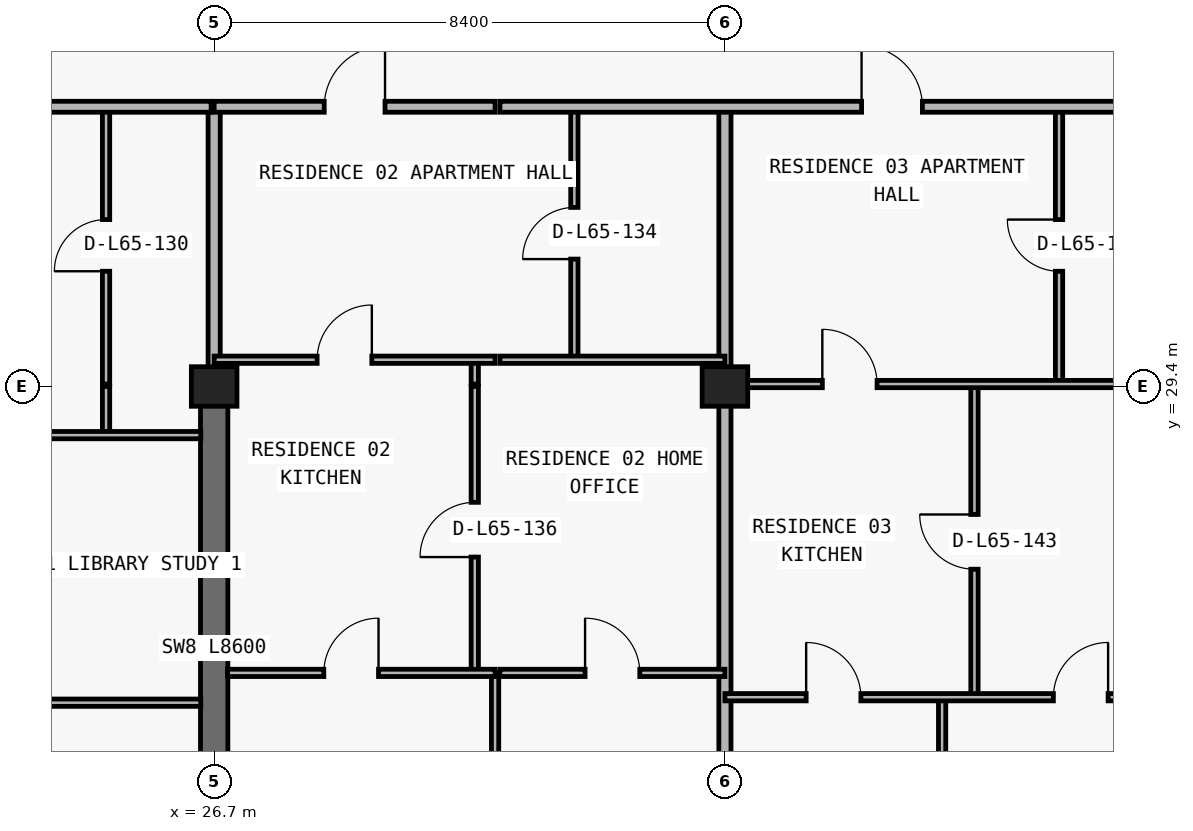
"""IFC4 building model, lengths in metres.
Left out: names, types, materials, properties, quantities, classifications, styles, units other than length and angle.
Written with IfcOpenShell. Run it as: python <this file> out.ifc"""

import sys

from ifc_helpers import new_model, si_unit, direction, frame, frame_2d, origin, origin_2d, place, context, subcontext, project, spatial, rectangle, extrude, element, fill, save


model = new_model("IFC4")
c1 = context("Model", 3, precision=1e-05, world=origin(), true_north=direction((0.0, 1.0)))
c2 = subcontext(c1, "Body", "Model", "MODEL_VIEW")
j1 = project(units=[si_unit("LENGTHUNIT", "METRE"), si_unit("PLANEANGLEUNIT", "RADIAN")], contexts=[c1])
p1 = place(None, origin())
s1 = spatial("IfcSite", under=j1, at=p1, CompositionType="ELEMENT")
p2 = place(p1, origin())
s2 = spatial("IfcBuilding", under=s1, at=p2, CompositionType="ELEMENT")
p3 = place(p2, frame((0.0, 0.0, 233.1)))
s3 = spatial("IfcBuildingStorey", under=s2, at=p3, CompositionType="ELEMENT", Elevation=233.1)
for number, where, z_axis, x_axis in (
    (1, (26.7, 29.4, 0.0), (0.0, 0.0, 1.0), (1.0, 0.0, 0.0)),
    (2, (35.1, 29.4, 0.0), (0.0, 0.0, 1.0), (1.0, 0.0, 0.0)),
):
    element("IfcColumn", number, at=place(p3, frame(where, z_axis=z_axis, x_axis=x_axis)), inside=s3, PredefinedType="COLUMN", context=c2, shape_type="SweptSolid", body=[
        extrude(rectangle(XDim=0.75, YDim=0.65, at=origin_2d()), origin(), (0.0, 0.0, 1.0), 3.05),
    ])
p4 = place(p3, frame((26.7, 20.8, 0.0), z_axis=(0.0, 0.0, 1.0), x_axis=(0.0, 1.0, 0.0)))
e3 = element("IfcWall", 3, at=p4, inside=s3, PredefinedType="SHEAR", context=c2, shape_type="SweptSolid", body=[
    extrude(rectangle(XDim=8.6, YDim=0.45, at=frame_2d((4.3, 0.0))), origin(), (0.0, 0.0, 1.0), 3.05),
])
p5 = place(p3, frame((24.922, 28.6, 0.0), z_axis=(0.0, 0.0, 1.0), x_axis=(0.0, 1.0, 0.0)))
e4 = element("IfcWall", 4, at=p5, inside=s3, PredefinedType="PARTITIONING", context=c2, shape_type="SweptSolid", body=[
    extrude(rectangle(XDim=0.8, YDim=0.12, at=frame_2d((0.4, 0.0))), origin(), (0.0, 0.0, 1.0), 3.05),
])
p6 = place(p3, frame((24.922, 29.44, 0.0), z_axis=(0.0, 0.0, 1.0), x_axis=(0.0, 1.0, 0.0)))
e5 = element("IfcWall", 5, at=p6, inside=s3, PredefinedType="PARTITIONING", context=c2, shape_type="SweptSolid", body=[
    extrude(rectangle(XDim=4.56, YDim=0.12, at=frame_2d((2.28, 0.0))), origin(), (0.0, 0.0, 1.0), 3.05),
])
p7 = place(p6, frame((1.855, 0.0, 0.0)))
e6 = element("IfcOpeningElement", 6, at=p7, cuts=e5, PredefinedType="OPENING", context=c2, shape_type="SweptSolid", body=[
    extrude(rectangle(XDim=0.85, YDim=2.1, at=frame_2d((0.425, 1.05))), frame((0.0, 0.07, 0.0), z_axis=(0.0, -1.0, 0.0), x_axis=(1.0, 0.0, 0.0)), (0.0, 0.0, 1.0), 0.14),
])
p8 = place(p3, frame((26.7, 29.44, 0.0), z_axis=(0.0, 0.0, 1.0), x_axis=(0.0, 1.0, 0.0)))
e7 = element("IfcWall", 7, at=p8, inside=s3, PredefinedType="PARTITIONING", context=c2, shape_type="SweptSolid", body=[
    extrude(rectangle(XDim=4.56, YDim=0.2, at=frame_2d((2.28, 0.0))), origin(), (0.0, 0.0, 1.0), 2.335),
])
p9 = place(p3, frame((30.986, 24.69, 0.0), z_axis=(0.0, 0.0, 1.0), x_axis=(0.0, 1.0, 0.0)))
e8 = element("IfcWall", 8, at=p9, inside=s3, PredefinedType="PARTITIONING", context=c2, shape_type="SweptSolid", body=[
    extrude(rectangle(XDim=4.71, YDim=0.12, at=frame_2d((2.355, 0.0))), origin(), (0.0, 0.0, 1.0), 2.578),
])
p10 = place(p9, frame((1.905, 0.0, 0.0)))
e9 = element("IfcOpeningElement", 9, at=p10, cuts=e8, PredefinedType="OPENING", context=c2, shape_type="SweptSolid", body=[
    extrude(rectangle(XDim=0.9, YDim=2.15, at=frame_2d((0.45, 1.075))), frame((0.0, 0.07, 0.0), z_axis=(0.0, -1.0, 0.0), x_axis=(1.0, 0.0, 0.0)), (0.0, 0.0, 1.0), 0.14),
])
p11 = place(p3, frame((30.986, 29.44, 0.0), z_axis=(0.0, 0.0, 1.0), x_axis=(0.0, 1.0, 0.0)))
e10 = element("IfcWall", 10, at=p11, inside=s3, PredefinedType="PARTITIONING", context=c2, shape_type="SweptSolid", body=[
    extrude(rectangle(XDim=0.4, YDim=0.12, at=frame_2d((0.2, 0.0))), origin(), (0.0, 0.0, 1.0), 2.725),
])
p12 = place(p3, frame((31.32, 13.34, 0.0), z_axis=(0.0, 0.0, 1.0), x_axis=(0.0, 1.0, 0.0)))
e11 = element("IfcWall", 11, at=p12, inside=s3, PredefinedType="PARTITIONING", context=c2, shape_type="SweptSolid", body=[
    extrude(rectangle(XDim=11.35, YDim=0.12, at=frame_2d((5.675, 0.0))), origin(), (0.0, 0.0, 1.0), 3.05),
])
p13 = place(p3, frame((32.624, 29.84, 0.0), z_axis=(0.0, 0.0, 1.0), x_axis=(0.0, 1.0, 0.0)))
e12 = element("IfcWall", 12, at=p13, inside=s3, PredefinedType="PARTITIONING", context=c2, shape_type="SweptSolid", body=[
    extrude(rectangle(XDim=4.16, YDim=0.12, at=frame_2d((2.08, 0.0))), origin(), (0.0, 0.0, 1.0), 3.05),
])
p14 = place(p13, frame((1.655, 0.0, 0.0)))
e13 = element("IfcOpeningElement", 13, at=p14, cuts=e12, PredefinedType="OPENING", context=c2, shape_type="SweptSolid", body=[
    extrude(rectangle(XDim=0.85, YDim=2.1, at=frame_2d((0.425, 1.05))), frame((0.0, 0.07, 0.0), z_axis=(0.0, -1.0, 0.0), x_axis=(1.0, 0.0, 0.0)), (0.0, 0.0, 1.0), 0.14),
])
p15 = place(p3, frame((35.1, 13.34, 0.0), z_axis=(0.0, 0.0, 1.0), x_axis=(0.0, 1.0, 0.0)))
e14 = element("IfcWall", 14, at=p15, inside=s3, PredefinedType="PARTITIONING", context=c2, shape_type="SweptSolid", body=[
    extrude(rectangle(XDim=16.06, YDim=0.2, at=frame_2d((8.03, 0.0))), origin(), (0.0, 0.0, 1.0), 2.263),
])
p16 = place(p3, frame((35.1, 29.44, 0.0), z_axis=(0.0, 0.0, 1.0), x_axis=(0.0, 1.0, 0.0)))
e15 = element("IfcWall", 15, at=p16, inside=s3, PredefinedType="PARTITIONING", context=c2, shape_type="SweptSolid", body=[
    extrude(rectangle(XDim=4.56, YDim=0.2, at=frame_2d((2.28, 0.0))), origin(), (0.0, 0.0, 1.0), 2.263),
])
p17 = place(p3, frame((38.672, 13.34, 0.0), z_axis=(0.0, 0.0, 1.0), x_axis=(0.0, 1.0, 0.0)))
e16 = element("IfcWall", 16, at=p17, inside=s3, PredefinedType="PARTITIONING", context=c2, shape_type="SweptSolid", body=[
    extrude(rectangle(XDim=10.95, YDim=0.12, at=frame_2d((5.475, 0.0))), origin(), (0.0, 0.0, 1.0), 2.578),
])
p18 = place(p3, frame((39.204, 24.29, 0.0), z_axis=(0.0, 0.0, 1.0), x_axis=(0.0, 1.0, 0.0)))
e17 = element("IfcWall", 17, at=p18, inside=s3, PredefinedType="PARTITIONING", context=c2, shape_type="SweptSolid", body=[
    extrude(rectangle(XDim=5.11, YDim=0.12, at=frame_2d((2.555, 0.0))), origin(), (0.0, 0.0, 1.0), 3.05),
])
p19 = place(p18, frame((2.105, 0.0, 0.0)))
e18 = element("IfcOpeningElement", 18, at=p19, cuts=e17, PredefinedType="OPENING", context=c2, shape_type="SweptSolid", body=[
    extrude(rectangle(XDim=0.9, YDim=2.15, at=frame_2d((0.45, 1.075))), frame((0.0, 0.07, 0.0), z_axis=(0.0, -1.0, 0.0), x_axis=(1.0, 0.0, 0.0)), (0.0, 0.0, 1.0), 0.14),
])
p20 = place(p3, frame((40.595, 29.44, 0.0), z_axis=(0.0, 0.0, 1.0), x_axis=(0.0, 1.0, 0.0)))
e19 = element("IfcWall", 19, at=p20, inside=s3, PredefinedType="PARTITIONING", context=c2, shape_type="SweptSolid", body=[
    extrude(rectangle(XDim=4.56, YDim=0.12, at=frame_2d((2.28, 0.0))), origin(), (0.0, 0.0, 1.0), 3.05),
])
p21 = place(p20, frame((1.855, 0.0, 0.0)))
e20 = element("IfcOpeningElement", 20, at=p21, cuts=e19, PredefinedType="OPENING", context=c2, shape_type="SweptSolid", body=[
    extrude(rectangle(XDim=0.85, YDim=2.1, at=frame_2d((0.425, 1.05))), frame((0.0, 0.07, 0.0), z_axis=(0.0, -1.0, 0.0), x_axis=(1.0, 0.0, 0.0)), (0.0, 0.0, 1.0), 0.14),
])
p22 = place(p3, frame((18.305, 24.2, 0.0), z_axis=(0.0, 0.0, 1.0), x_axis=(1.0, 0.0, 0.0)))
e21 = element("IfcWall", 21, at=p22, inside=s3, PredefinedType="PARTITIONING", context=c2, shape_type="SweptSolid", body=[
    extrude(rectangle(XDim=8.175, YDim=0.12, at=frame_2d((4.087, 0.0))), origin(), (0.0, 0.0, 1.0), 3.05),
])
p23 = place(p22, frame((3.637, 0.0, 0.0)))
e22 = element("IfcOpeningElement", 22, at=p23, cuts=e21, PredefinedType="OPENING", context=c2, shape_type="SweptSolid", body=[
    extrude(rectangle(XDim=0.9, YDim=2.15, at=frame_2d((0.45, 1.075))), frame((0.0, 0.07, 0.0), z_axis=(0.0, -1.0, 0.0), x_axis=(1.0, 0.0, 0.0)), (0.0, 0.0, 1.0), 0.14),
])
p24 = place(p3, frame((35.1, 24.29, 0.0), z_axis=(0.0, 0.0, 1.0), x_axis=(1.0, 0.0, 0.0)))
e23 = element("IfcWall", 23, at=p24, inside=s3, PredefinedType="PARTITIONING", context=c2, shape_type="SweptSolid", body=[
    extrude(rectangle(XDim=7.6, YDim=0.12, at=frame_2d((3.8, 0.0))), origin(), (0.0, 0.0, 1.0), 3.05),
])
p25 = place(p24, frame((1.336, 0.0, 0.0)))
e24 = element("IfcOpeningElement", 24, at=p25, cuts=e23, PredefinedType="OPENING", context=c2, shape_type="SweptSolid", body=[
    extrude(rectangle(XDim=0.9, YDim=2.15, at=frame_2d((0.45, 1.075))), frame((0.0, 0.07, 0.0), z_axis=(0.0, -1.0, 0.0), x_axis=(1.0, 0.0, 0.0)), (0.0, 0.0, 1.0), 0.14),
])
p26 = place(p24, frame((5.402, 0.0, 0.0)))
e25 = element("IfcOpeningElement", 25, at=p26, cuts=e23, PredefinedType="OPENING", context=c2, shape_type="SweptSolid", body=[
    extrude(rectangle(XDim=0.9, YDim=2.15, at=frame_2d((0.45, 1.075))), frame((0.0, 0.07, 0.0), z_axis=(0.0, -1.0, 0.0), x_axis=(1.0, 0.0, 0.0)), (0.0, 0.0, 1.0), 0.14),
])
p27 = place(p3, frame((26.92, 24.69, 0.0), z_axis=(0.0, 0.0, 1.0), x_axis=(1.0, 0.0, 0.0)))
e26 = element("IfcWall", 26, at=p27, inside=s3, PredefinedType="PARTITIONING", context=c2, shape_type="SweptSolid", body=[
    extrude(rectangle(XDim=4.4, YDim=0.12, at=frame_2d((2.2, 0.0))), origin(), (0.0, 0.0, 1.0), 3.05),
])
p28 = place(p27, frame((1.583, 0.0, 0.0)))
e27 = element("IfcOpeningElement", 27, at=p28, cuts=e26, PredefinedType="OPENING", context=c2, shape_type="SweptSolid", body=[
    extrude(rectangle(XDim=0.9, YDim=2.15, at=frame_2d((0.45, 1.075))), frame((0.0, 0.07, 0.0), z_axis=(0.0, -1.0, 0.0), x_axis=(1.0, 0.0, 0.0)), (0.0, 0.0, 1.0), 0.14),
])
p29 = place(p3, frame((31.4, 24.69, 0.0), z_axis=(0.0, 0.0, 1.0), x_axis=(1.0, 0.0, 0.0)))
e28 = element("IfcWall", 28, at=p29, inside=s3, PredefinedType="PARTITIONING", context=c2, shape_type="SweptSolid", body=[
    extrude(rectangle(XDim=3.7, YDim=0.12, at=frame_2d((1.85, 0.0))), origin(), (0.0, 0.0, 1.0), 3.05),
])
p30 = place(p29, frame((1.4, 0.0, 0.0)))
e29 = element("IfcOpeningElement", 29, at=p30, cuts=e28, PredefinedType="OPENING", context=c2, shape_type="SweptSolid", body=[
    extrude(rectangle(XDim=0.9, YDim=2.15, at=frame_2d((0.45, 1.075))), frame((0.0, 0.07, 0.0), z_axis=(0.0, -1.0, 0.0), x_axis=(1.0, 0.0, 0.0)), (0.0, 0.0, 1.0), 0.14),
])
p31 = place(p3, frame((18.3, 28.6, 0.0), z_axis=(0.0, 0.0, 1.0), x_axis=(1.0, 0.0, 0.0)))
e30 = element("IfcWall", 30, at=p31, inside=s3, PredefinedType="PARTITIONING", context=c2, shape_type="SweptSolid", body=[
    extrude(rectangle(XDim=8.18, YDim=0.12, at=frame_2d((4.09, 0.0))), origin(), (0.0, 0.0, 1.0), 3.05),
])
p32 = place(p31, frame((2.861, 0.0, 0.0)))
e31 = element("IfcOpeningElement", 31, at=p32, cuts=e30, PredefinedType="OPENING", context=c2, shape_type="SweptSolid", body=[
    extrude(rectangle(XDim=0.9, YDim=2.15, at=frame_2d((0.45, 1.075))), frame((0.0, 0.07, 0.0), z_axis=(0.0, -1.0, 0.0), x_axis=(1.0, 0.0, 0.0)), (0.0, 0.0, 1.0), 0.14),
])
p33 = place(p3, frame((35.1, 29.44, 0.0), z_axis=(0.0, 0.0, 1.0), x_axis=(1.0, 0.0, 0.0)))
e32 = element("IfcWall", 32, at=p33, inside=s3, PredefinedType="PARTITIONING", context=c2, shape_type="SweptSolid", body=[
    extrude(rectangle(XDim=7.6, YDim=0.12, at=frame_2d((3.8, 0.0))), origin(), (0.0, 0.0, 1.0), 2.263),
])
p34 = place(p33, frame((1.602, 0.0, 0.0)))
e33 = element("IfcOpeningElement", 33, at=p34, cuts=e32, PredefinedType="OPENING", context=c2, shape_type="SweptSolid", body=[
    extrude(rectangle(XDim=0.9, YDim=2.15, at=frame_2d((0.45, 1.075))), frame((0.0, 0.07, 0.0), z_axis=(0.0, -1.0, 0.0), x_axis=(1.0, 0.0, 0.0)), (0.0, 0.0, 1.0), 0.14),
])
p35 = place(p3, frame((26.7, 29.84, 0.0), z_axis=(0.0, 0.0, 1.0), x_axis=(1.0, 0.0, 0.0)))
e34 = element("IfcWall", 34, at=p35, inside=s3, PredefinedType="PARTITIONING", context=c2, shape_type="SweptSolid", body=[
    extrude(rectangle(XDim=4.62, YDim=0.12, at=frame_2d((2.31, 0.0))), origin(), (0.0, 0.0, 1.0), 3.05),
])
p36 = place(p35, frame((1.693, 0.0, 0.0)))
e35 = element("IfcOpeningElement", 35, at=p36, cuts=e34, PredefinedType="OPENING", context=c2, shape_type="SweptSolid", body=[
    extrude(rectangle(XDim=0.9, YDim=2.15, at=frame_2d((0.45, 1.075))), frame((0.0, 0.07, 0.0), z_axis=(0.0, -1.0, 0.0), x_axis=(1.0, 0.0, 0.0)), (0.0, 0.0, 1.0), 0.14),
])
p37 = place(p3, frame((31.4, 29.84, 0.0), z_axis=(0.0, 0.0, 1.0), x_axis=(1.0, 0.0, 0.0)))
e36 = element("IfcWall", 36, at=p37, inside=s3, PredefinedType="PARTITIONING", context=c2, shape_type="SweptSolid", body=[
    extrude(rectangle(XDim=3.7, YDim=0.12, at=frame_2d((1.85, 0.0))), origin(), (0.0, 0.0, 1.0), 3.05),
])
p38 = place(p3, frame((12.105, 34.0, 0.0), z_axis=(0.0, 0.0, 1.0), x_axis=(1.0, 0.0, 0.0)))
e37 = element("IfcWall", 37, at=p38, inside=s3, PredefinedType="PARTITIONING", context=c2, shape_type="SweptSolid", body=[
    extrude(rectangle(XDim=14.545, YDim=0.18, at=frame_2d((7.272, 0.0))), origin(), (0.0, 0.0, 1.0), 3.05),
])
p39 = place(p38, frame((1.607, 0.0, 0.0)))
e38 = element("IfcOpeningElement", 38, at=p39, cuts=e37, PredefinedType="OPENING", context=c2, shape_type="SweptSolid", body=[
    extrude(rectangle(XDim=1.0, YDim=2.2, at=frame_2d((0.5, 1.1))), frame((0.0, 0.1, 0.0), z_axis=(0.0, -1.0, 0.0), x_axis=(1.0, 0.0, 0.0)), (0.0, 0.0, 1.0), 0.2),
])
p40 = place(p3, frame((26.7, 34.0, 0.0), z_axis=(0.0, 0.0, 1.0), x_axis=(1.0, 0.0, 0.0)))
e39 = element("IfcWall", 39, at=p40, inside=s3, PredefinedType="PARTITIONING", context=c2, shape_type="SweptSolid", body=[
    extrude(rectangle(XDim=4.62, YDim=0.18, at=frame_2d((2.31, 0.0))), origin(), (0.0, 0.0, 1.0), 3.05),
])
p41 = place(p40, frame((1.81, 0.0, 0.0)))
e40 = element("IfcOpeningElement", 40, at=p41, cuts=e39, PredefinedType="OPENING", context=c2, shape_type="SweptSolid", body=[
    extrude(rectangle(XDim=1.0, YDim=2.2, at=frame_2d((0.5, 1.1))), frame((0.0, 0.1, 0.0), z_axis=(0.0, -1.0, 0.0), x_axis=(1.0, 0.0, 0.0)), (0.0, 0.0, 1.0), 0.2),
])
p42 = place(p3, frame((31.4, 34.0, 0.0), z_axis=(0.0, 0.0, 1.0), x_axis=(1.0, 0.0, 0.0)))
e41 = element("IfcWall", 41, at=p42, inside=s3, PredefinedType="PARTITIONING", context=c2, shape_type="SweptSolid", body=[
    extrude(rectangle(XDim=34.3, YDim=0.18, at=frame_2d((17.15, 0.0))), origin(), (0.0, 0.0, 1.0), 3.05),
])
p43 = place(p42, frame((5.948, 0.0, 0.0)))
e42 = element("IfcOpeningElement", 42, at=p43, cuts=e41, PredefinedType="OPENING", context=c2, shape_type="SweptSolid", body=[
    extrude(rectangle(XDim=1.0, YDim=2.2, at=frame_2d((0.5, 1.1))), frame((0.0, 0.1, 0.0), z_axis=(0.0, -1.0, 0.0), x_axis=(1.0, 0.0, 0.0)), (0.0, 0.0, 1.0), 0.2),
])
p44 = place(p42, frame((13.796, 0.0, 0.0)))
e43 = element("IfcOpeningElement", 43, at=p44, cuts=e41, PredefinedType="OPENING", context=c2, shape_type="SweptSolid", body=[
    extrude(rectangle(XDim=1.0, YDim=2.2, at=frame_2d((0.5, 1.1))), frame((0.0, 0.1, 0.0), z_axis=(0.0, -1.0, 0.0), x_axis=(1.0, 0.0, 0.0)), (0.0, 0.0, 1.0), 0.2),
])
p45 = place(p42, frame((22.409, 0.0, 0.0)))
e44 = element("IfcOpeningElement", 44, at=p45, cuts=e41, PredefinedType="OPENING", context=c2, shape_type="SweptSolid", body=[
    extrude(rectangle(XDim=1.0, YDim=2.2, at=frame_2d((0.5, 1.1))), frame((0.0, 0.1, 0.0), z_axis=(0.0, -1.0, 0.0), x_axis=(1.0, 0.0, 0.0)), (0.0, 0.0, 1.0), 0.2),
])
p46 = place(p7, origin())
e45 = element("IfcDoor", 45, at=p46, inside=s3, OperationType="SINGLE_SWING_LEFT", PredefinedType="DOOR", context=c2, shape_type="SweptSolid", body=[
    extrude(rectangle(XDim=0.85, YDim=2.1, at=frame_2d((0.425, 1.05))), frame((0.0, 0.025, 0.0), z_axis=(0.0, -1.0, 0.0), x_axis=(1.0, 0.0, 0.0)), (0.0, 0.0, 1.0), 0.05),
])
fill(e6, e45)
p47 = place(p41, origin())
e46 = element("IfcDoor", 46, at=p47, inside=s3, OperationType="SINGLE_SWING_RIGHT", PredefinedType="DOOR", context=c2, shape_type="SweptSolid", body=[
    extrude(rectangle(XDim=1.0, YDim=2.2, at=frame_2d((0.5, 1.1))), frame((0.0, 0.025, 0.0), z_axis=(0.0, -1.0, 0.0), x_axis=(1.0, 0.0, 0.0)), (0.0, 0.0, 1.0), 0.05),
])
fill(e40, e46)
p48 = place(p14, origin())
e47 = element("IfcDoor", 47, at=p48, inside=s3, OperationType="SINGLE_SWING_LEFT", PredefinedType="DOOR", context=c2, shape_type="SweptSolid", body=[
    extrude(rectangle(XDim=0.85, YDim=2.1, at=frame_2d((0.425, 1.05))), frame((0.0, 0.025, 0.0), z_axis=(0.0, -1.0, 0.0), x_axis=(1.0, 0.0, 0.0)), (0.0, 0.0, 1.0), 0.05),
])
fill(e13, e47)
p49 = place(p36, origin())
e48 = element("IfcDoor", 48, at=p49, inside=s3, OperationType="SINGLE_SWING_RIGHT", PredefinedType="DOOR", context=c2, shape_type="SweptSolid", body=[
    extrude(rectangle(XDim=0.9, YDim=2.15, at=frame_2d((0.45, 1.075))), frame((0.0, 0.025, 0.0), z_axis=(0.0, -1.0, 0.0), x_axis=(1.0, 0.0, 0.0)), (0.0, 0.0, 1.0), 0.05),
])
fill(e35, e48)
p50 = place(p10, origin())
e49 = element("IfcDoor", 49, at=p50, inside=s3, OperationType="SINGLE_SWING_LEFT", PredefinedType="DOOR", context=c2, shape_type="SweptSolid", body=[
    extrude(rectangle(XDim=0.9, YDim=2.15, at=frame_2d((0.45, 1.075))), frame((0.0, 0.025, 0.0), z_axis=(0.0, -1.0, 0.0), x_axis=(1.0, 0.0, 0.0)), (0.0, 0.0, 1.0), 0.05),
])
fill(e9, e49)
p51 = place(p28, origin())
e50 = element("IfcDoor", 50, at=p51, inside=s3, OperationType="SINGLE_SWING_RIGHT", PredefinedType="DOOR", context=c2, shape_type="SweptSolid", body=[
    extrude(rectangle(XDim=0.9, YDim=2.15, at=frame_2d((0.45, 1.075))), frame((0.0, 0.025, 0.0), z_axis=(0.0, -1.0, 0.0), x_axis=(1.0, 0.0, 0.0)), (0.0, 0.0, 1.0), 0.05),
])
fill(e27, e50)
p52 = place(p30, origin())
e51 = element("IfcDoor", 51, at=p52, inside=s3, OperationType="SINGLE_SWING_LEFT", PredefinedType="DOOR", context=c2, shape_type="SweptSolid", body=[
    extrude(rectangle(XDim=0.9, YDim=2.15, at=frame_2d((0.45, 1.075))), frame((0.0, 0.025, 0.0), z_axis=(0.0, -1.0, 0.0), x_axis=(1.0, 0.0, 0.0)), (0.0, 0.0, 1.0), 0.05),
])
fill(e29, e51)
p53 = place(p43, origin())
e52 = element("IfcDoor", 52, at=p53, inside=s3, OperationType="SINGLE_SWING_LEFT", PredefinedType="DOOR", context=c2, shape_type="SweptSolid", body=[
    extrude(rectangle(XDim=1.0, YDim=2.2, at=frame_2d((0.5, 1.1))), frame((0.0, 0.025, 0.0), z_axis=(0.0, -1.0, 0.0), x_axis=(1.0, 0.0, 0.0)), (0.0, 0.0, 1.0), 0.05),
])
fill(e42, e52)
p54 = place(p21, origin())
e53 = element("IfcDoor", 53, at=p54, inside=s3, OperationType="SINGLE_SWING_RIGHT", PredefinedType="DOOR", context=c2, shape_type="SweptSolid", body=[
    extrude(rectangle(XDim=0.85, YDim=2.1, at=frame_2d((0.425, 1.05))), frame((0.0, 0.025, 0.0), z_axis=(0.0, -1.0, 0.0), x_axis=(1.0, 0.0, 0.0)), (0.0, 0.0, 1.0), 0.05),
])
fill(e20, e53)
p55 = place(p34, origin())
e54 = element("IfcDoor", 54, at=p55, inside=s3, OperationType="SINGLE_SWING_LEFT", PredefinedType="DOOR", context=c2, shape_type="SweptSolid", body=[
    extrude(rectangle(XDim=0.9, YDim=2.15, at=frame_2d((0.45, 1.075))), frame((0.0, 0.025, 0.0), z_axis=(0.0, -1.0, 0.0), x_axis=(1.0, 0.0, 0.0)), (0.0, 0.0, 1.0), 0.05),
])
fill(e33, e54)
p56 = place(p19, origin())
e55 = element("IfcDoor", 55, at=p56, inside=s3, OperationType="SINGLE_SWING_RIGHT", PredefinedType="DOOR", context=c2, shape_type="SweptSolid", body=[
    extrude(rectangle(XDim=0.9, YDim=2.15, at=frame_2d((0.45, 1.075))), frame((0.0, 0.025, 0.0), z_axis=(0.0, -1.0, 0.0), x_axis=(1.0, 0.0, 0.0)), (0.0, 0.0, 1.0), 0.05),
])
fill(e18, e55)
p57 = place(p25, origin())
e56 = element("IfcDoor", 56, at=p57, inside=s3, OperationType="SINGLE_SWING_LEFT", PredefinedType="DOOR", context=c2, shape_type="SweptSolid", body=[
    extrude(rectangle(XDim=0.9, YDim=2.15, at=frame_2d((0.45, 1.075))), frame((0.0, 0.025, 0.0), z_axis=(0.0, -1.0, 0.0), x_axis=(1.0, 0.0, 0.0)), (0.0, 0.0, 1.0), 0.05),
])
fill(e24, e56)
p58 = place(p26, origin())
e57 = element("IfcDoor", 57, at=p58, inside=s3, OperationType="SINGLE_SWING_RIGHT", PredefinedType="DOOR", context=c2, shape_type="SweptSolid", body=[
    extrude(rectangle(XDim=0.9, YDim=2.15, at=frame_2d((0.45, 1.075))), frame((0.0, 0.025, 0.0), z_axis=(0.0, -1.0, 0.0), x_axis=(1.0, 0.0, 0.0)), (0.0, 0.0, 1.0), 0.05),
])
fill(e25, e57)
save(model, sys.argv[1])
